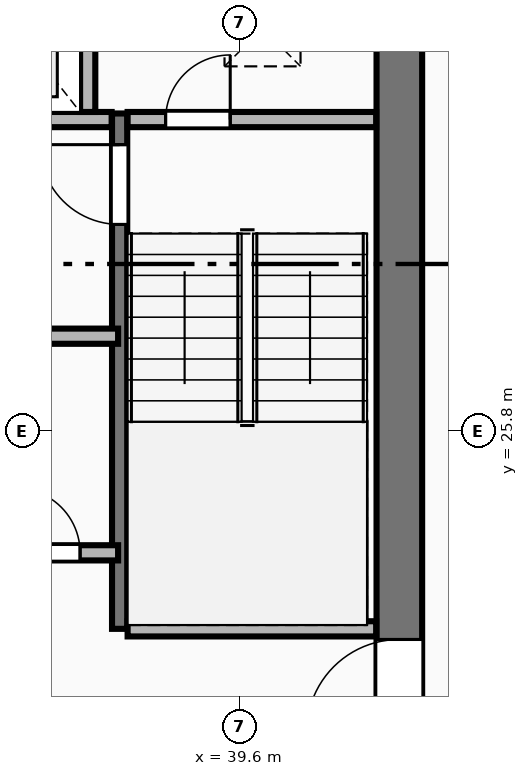
"""IFC4 building model, lengths in metres.
Left out: names, types, materials, properties, quantities, classifications, styles, units other than length and angle.
Written with IfcOpenShell. Run it as: python <this file> out.ifc"""

import sys

from ifc_helpers import new_model, si_unit, direction, frame, frame_2d, origin, place, context, subcontext, project, spatial, rectangle, extrude, element, fill, save


model = new_model("IFC4")
c1 = context("Model", 3, precision=1e-05, world=origin(), true_north=direction((0.0, 1.0)))
c2 = subcontext(c1, "Body", "Model", "MODEL_VIEW")
j1 = project(units=[si_unit("LENGTHUNIT", "METRE"), si_unit("PLANEANGLEUNIT", "RADIAN")], contexts=[c1])
p1 = place(None, origin())
s1 = spatial("IfcSite", under=j1, at=p1, CompositionType="ELEMENT")
p2 = place(p1, origin())
s2 = spatial("IfcBuilding", under=s1, at=p2, CompositionType="ELEMENT")
p3 = place(p2, frame((0.0, 0.0, 175.45)))
s3 = spatial("IfcBuildingStorey", under=s2, at=p3, CompositionType="ELEMENT", Elevation=175.45)
p4 = place(p3, frame((41.7, 18.925, 0.0), z_axis=(0.0, 0.0, 1.0), x_axis=(0.0, 1.0, 0.0)))
e1 = element("IfcWall", 1, at=p4, inside=s3, PredefinedType="SHEAR", context=c2, shape_type="SweptSolid", body=[
    extrude(rectangle(XDim=13.95, YDim=0.6, at=frame_2d((6.975, 0.0))), origin(), (0.0, 0.0, 1.0), 3.35),
])
p5 = place(p4, frame((2.915, 0.0, 0.0)))
e2 = element("IfcOpeningElement", 2, at=p5, cuts=e1, PredefinedType="OPENING", context=c2, shape_type="SweptSolid", body=[
    extrude(rectangle(XDim=1.22, YDim=2.25, at=frame_2d((0.61, 1.125))), frame((0.0, 0.31, 0.0), z_axis=(0.0, -1.0, 0.0), x_axis=(1.0, 0.0, 0.0)), (0.0, 0.0, 1.0), 0.62),
])
p6 = place(p3, frame((38.02, 23.2, 0.0), z_axis=(0.0, 0.0, 1.0), x_axis=(0.0, 1.0, 0.0)))
e3 = element("IfcWall", 3, at=p6, inside=s3, PredefinedType="SHEAR", context=c2, shape_type="SweptSolid", body=[
    extrude(rectangle(XDim=6.78, YDim=0.2, at=frame_2d((3.39, 0.0))), origin(), (0.0, 0.0, 1.0), 3.55),
])
p7 = place(p6, frame((5.32, 0.0, 0.0)))
e4 = element("IfcOpeningElement", 4, at=p7, cuts=e3, PredefinedType="OPENING", context=c2, shape_type="SweptSolid", body=[
    extrude(rectangle(XDim=1.05, YDim=2.15, at=frame_2d((0.525, 1.075))), frame((0.0, 0.11, 0.0), z_axis=(0.0, -1.0, 0.0), x_axis=(1.0, 0.0, 0.0)), (0.0, 0.0, 1.0), 0.22),
])
p8 = place(p3, frame((38.125, 23.2, 0.0), z_axis=(0.0, 0.0, 1.0), x_axis=(1.0, 0.0, 0.0)))
e5 = element("IfcWall", 5, at=p8, inside=s3, PredefinedType="PLUMBINGWALL", context=c2, shape_type="SweptSolid", body=[
    extrude(rectangle(XDim=3.27, YDim=0.2, at=frame_2d((1.635, 0.0))), origin(), (0.0, 0.0, 1.0), 3.35),
])
p9 = place(p3, frame((34.9, 29.9, 0.0), z_axis=(0.0, 0.0, 1.0), x_axis=(1.0, 0.0, 0.0)))
e6 = element("IfcWall", 6, at=p9, inside=s3, PredefinedType="PLUMBINGWALL", context=c2, shape_type="SweptSolid", body=[
    extrude(rectangle(XDim=3.015, YDim=0.2, at=frame_2d((1.508, 0.0))), origin(), (0.0, 0.0, 1.0), 3.35),
])
p10 = place(p9, frame((0.725, 0.0, 0.0)))
e7 = element("IfcOpeningElement", 7, at=p10, cuts=e6, PredefinedType="OPENING", context=c2, shape_type="SweptSolid", body=[
    extrude(rectangle(XDim=1.15, YDim=2.2, at=frame_2d((0.575, 1.1))), frame((0.0, 0.11, 0.0), z_axis=(0.0, -1.0, 0.0), x_axis=(1.0, 0.0, 0.0)), (0.0, 0.0, 1.0), 0.22),
])
p11 = place(p3, frame((38.125, 29.9, 0.0), z_axis=(0.0, 0.0, 1.0), x_axis=(1.0, 0.0, 0.0)))
e8 = element("IfcWall", 8, at=p11, inside=s3, PredefinedType="PLUMBINGWALL", context=c2, shape_type="SweptSolid", body=[
    extrude(rectangle(XDim=3.27, YDim=0.2, at=frame_2d((1.635, 0.0))), origin(), (0.0, 0.0, 1.0), 3.35),
])
p12 = place(p11, frame((0.5, 0.0, 0.0)))
e9 = element("IfcOpeningElement", 9, at=p12, cuts=e8, PredefinedType="OPENING", context=c2, shape_type="SweptSolid", body=[
    extrude(rectangle(XDim=0.85, YDim=2.05, at=frame_2d((0.425, 1.025))), frame((0.0, 0.11, 0.0), z_axis=(0.0, -1.0, 0.0), x_axis=(1.0, 0.0, 0.0)), (0.0, 0.0, 1.0), 0.22),
])
p13 = place(p3, frame((37.6, 30.0, 0.0), z_axis=(0.0, 0.0, 1.0), x_axis=(0.0, 1.0, 0.0)))
e10 = element("IfcWall", 10, at=p13, inside=s3, PredefinedType="PLUMBINGWALL", context=c2, shape_type="SweptSolid", body=[
    extrude(rectangle(XDim=2.85, YDim=0.2, at=frame_2d((1.425, 0.0))), origin(), (0.0, 0.0, 1.0), 3.35),
])
p14 = place(p3, frame((34.8, 27.05, 0.0), z_axis=(0.0, 0.0, 1.0), x_axis=(1.0, 0.0, 0.0)))
e11 = element("IfcWall", 11, at=p14, inside=s3, PredefinedType="PLUMBINGWALL", context=c2, shape_type="SweptSolid", body=[
    extrude(rectangle(XDim=3.2, YDim=0.2, at=frame_2d((1.6, 0.0))), origin(), (0.0, 0.0, 1.0), 3.35),
])
p15 = place(p3, frame((31.2, 24.2, 0.0), z_axis=(0.0, 0.0, 1.0), x_axis=(1.0, 0.0, 0.0)))
e12 = element("IfcWall", 12, at=p15, inside=s3, PredefinedType="PLUMBINGWALL", context=c2, shape_type="SweptSolid", body=[
    extrude(rectangle(XDim=6.8, YDim=0.2, at=frame_2d((3.4, 0.0))), origin(), (0.0, 0.0, 1.0), 3.35),
])
p16 = place(p15, frame((0.65, 0.0, 0.0)))
e13 = element("IfcOpeningElement", 13, at=p16, cuts=e12, PredefinedType="OPENING", context=c2, shape_type="SweptSolid", body=[
    extrude(rectangle(XDim=1.1, YDim=2.2, at=frame_2d((0.55, 1.1))), frame((0.0, 0.11, 0.0), z_axis=(0.0, -1.0, 0.0), x_axis=(1.0, 0.0, 0.0)), (0.0, 0.0, 1.0), 0.22),
])
p17 = place(p15, frame((2.55, 0.0, 0.0)))
e14 = element("IfcOpeningElement", 14, at=p17, cuts=e12, PredefinedType="OPENING", context=c2, shape_type="SweptSolid", body=[
    extrude(rectangle(XDim=0.85, YDim=2.05, at=frame_2d((0.425, 1.025))), frame((0.0, 0.11, 0.0), z_axis=(0.0, -1.0, 0.0), x_axis=(1.0, 0.0, 0.0)), (0.0, 0.0, 1.0), 0.22),
])
p18 = place(p15, frame((4.0, 0.0, 0.0)))
e15 = element("IfcOpeningElement", 15, at=p18, cuts=e12, PredefinedType="OPENING", context=c2, shape_type="SweptSolid", body=[
    extrude(rectangle(XDim=0.85, YDim=2.05, at=frame_2d((0.425, 1.025))), frame((0.0, 0.11, 0.0), z_axis=(0.0, -1.0, 0.0), x_axis=(1.0, 0.0, 0.0)), (0.0, 0.0, 1.0), 0.22),
])
p19 = place(p15, frame((5.45, 0.0, 0.0)))
e16 = element("IfcOpeningElement", 16, at=p19, cuts=e12, PredefinedType="OPENING", context=c2, shape_type="SweptSolid", body=[
    extrude(rectangle(XDim=0.85, YDim=2.05, at=frame_2d((0.425, 1.025))), frame((0.0, 0.11, 0.0), z_axis=(0.0, -1.0, 0.0), x_axis=(1.0, 0.0, 0.0)), (0.0, 0.0, 1.0), 0.22),
])
p20 = place(p5, origin())
e17 = element("IfcDoor", 17, at=p20, inside=s3, OperationType="SINGLE_SWING_LEFT", PredefinedType="DOOR", context=c2, shape_type="SweptSolid", body=[
    extrude(rectangle(XDim=1.22, YDim=2.25, at=frame_2d((0.61, 1.125))), frame((0.0, 0.025, 0.0), z_axis=(0.0, -1.0, 0.0), x_axis=(1.0, 0.0, 0.0)), (0.0, 0.0, 1.0), 0.05),
])
fill(e2, e17)
p21 = place(p7, origin())
e18 = element("IfcDoor", 18, at=p21, inside=s3, OperationType="SINGLE_SWING_RIGHT", PredefinedType="DOOR", context=c2, shape_type="SweptSolid", body=[
    extrude(rectangle(XDim=1.05, YDim=2.15, at=frame_2d((0.525, 1.075))), frame((0.0, 0.025, 0.0), z_axis=(0.0, -1.0, 0.0), x_axis=(1.0, 0.0, 0.0)), (0.0, 0.0, 1.0), 0.05),
])
fill(e4, e18)
p22 = place(p12, origin())
e19 = element("IfcDoor", 19, at=p22, inside=s3, OperationType="SINGLE_SWING_RIGHT", PredefinedType="DOOR", context=c2, shape_type="SweptSolid", body=[
    extrude(rectangle(XDim=0.85, YDim=2.05, at=frame_2d((0.425, 1.025))), frame((0.0, 0.025, 0.0), z_axis=(0.0, -1.0, 0.0), x_axis=(1.0, 0.0, 0.0)), (0.0, 0.0, 1.0), 0.05),
])
fill(e9, e19)
p23 = place(p19, origin())
e20 = element("IfcDoor", 20, at=p23, inside=s3, OperationType="SINGLE_SWING_LEFT", PredefinedType="DOOR", context=c2, shape_type="SweptSolid", body=[
    extrude(rectangle(XDim=0.85, YDim=2.05, at=frame_2d((0.425, 1.025))), frame((0.0, 0.025, 0.0), z_axis=(0.0, -1.0, 0.0), x_axis=(1.0, 0.0, 0.0)), (0.0, 0.0, 1.0), 0.05),
])
fill(e16, e20)
save(model, sys.argv[1])
